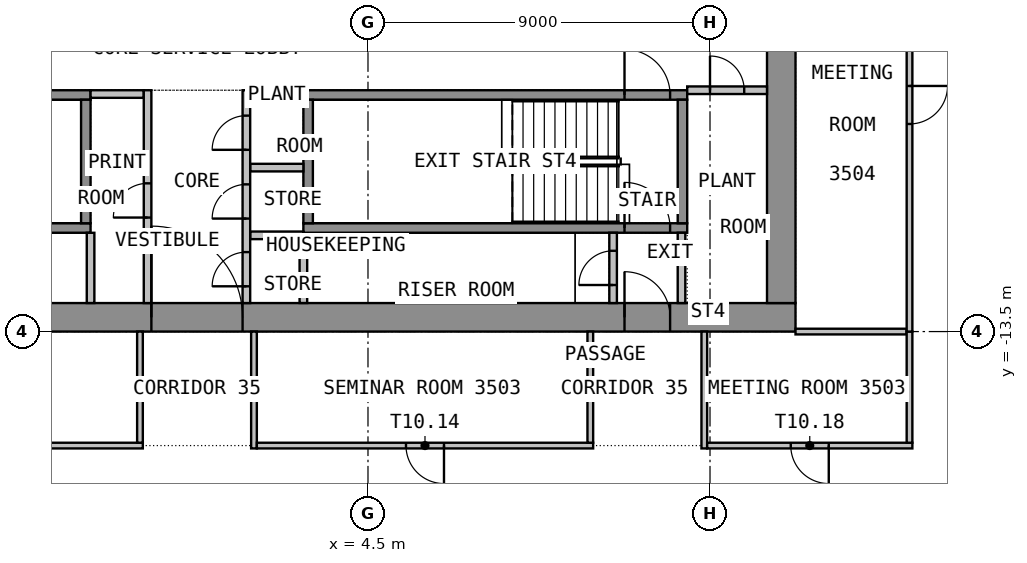
"""IFC4 building model, lengths in metres.
Left out: names, types, materials, properties, quantities, classifications, styles, units other than length and angle.
Written with IfcOpenShell. Run it as: python <this file> out.ifc"""

import sys

from ifc_helpers import new_model, si_unit, direction, frame, frame_2d, origin, place, context, subcontext, project, spatial, rectangle, extrude, element, fill, save


model = new_model("IFC4")
c1 = context("Model", 3, precision=1e-05, world=origin(), true_north=direction((0.0, 1.0)))
c2 = subcontext(c1, "Body", "Model", "MODEL_VIEW")
j1 = project(units=[si_unit("LENGTHUNIT", "METRE"), si_unit("PLANEANGLEUNIT", "RADIAN")], contexts=[c1])
p1 = place(None, origin())
s1 = spatial("IfcSite", under=j1, at=p1, CompositionType="ELEMENT")
p2 = place(p1, origin())
s2 = spatial("IfcBuilding", under=s1, at=p2, CompositionType="ELEMENT")
p3 = place(p2, frame((0.0, 0.0, 144.3)))
s3 = spatial("IfcBuildingStorey", under=s2, at=p3, CompositionType="ELEMENT", Elevation=144.3)
p4 = place(p3, frame((-15.75, -13.125, 0.0), z_axis=(0.0, 0.0, 1.0), x_axis=(1.0, 0.0, 0.0)))
e1 = element("IfcWall", 1, at=p4, inside=s3, PredefinedType="SHEAR", context=c2, shape_type="SweptSolid", body=[
    extrude(rectangle(XDim=31.5, YDim=0.75, at=frame_2d((15.75, 0.0))), origin(), (0.0, 0.0, 1.0), 3.575),
])
p5 = place(p4, frame((14.55, 0.0, 0.0)))
e2 = element("IfcOpeningElement", 2, at=p5, cuts=e1, PredefinedType="OPENING", context=c2, shape_type="SweptSolid", body=[
    extrude(rectangle(XDim=2.4, YDim=2.1, at=frame_2d((1.2, 1.05))), frame((0.0, 0.385, 0.0), z_axis=(0.0, -1.0, 0.0), x_axis=(1.0, 0.0, 0.0)), (0.0, 0.0, 1.0), 0.77),
])
p6 = place(p4, frame((3.3, 0.0, 0.0)))
e3 = element("IfcOpeningElement", 3, at=p6, cuts=e1, PredefinedType="OPENING", context=c2, shape_type="SweptSolid", body=[
    extrude(rectangle(XDim=1.2, YDim=2.1, at=frame_2d((0.6, 1.05))), frame((0.0, 0.385, 0.0), z_axis=(0.0, -1.0, 0.0), x_axis=(1.0, 0.0, 0.0)), (0.0, 0.0, 1.0), 0.77),
])
p7 = place(p4, frame((27.0, 0.0, 0.0)))
e4 = element("IfcOpeningElement", 4, at=p7, cuts=e1, PredefinedType="OPENING", context=c2, shape_type="SweptSolid", body=[
    extrude(rectangle(XDim=1.2, YDim=2.1, at=frame_2d((0.6, 1.05))), frame((0.0, 0.385, 0.0), z_axis=(0.0, -1.0, 0.0), x_axis=(1.0, 0.0, 0.0)), (0.0, 0.0, 1.0), 0.77),
])
p8 = place(p3, frame((15.375, -12.75, 0.0), z_axis=(0.0, 0.0, 1.0), x_axis=(0.0, 1.0, 0.0)))
e5 = element("IfcWall", 5, at=p8, inside=s3, PredefinedType="SHEAR", context=c2, shape_type="SweptSolid", body=[
    extrude(rectangle(XDim=25.5, YDim=0.75, at=frame_2d((12.75, 0.0))), origin(), (0.0, 0.0, 1.0), 3.575),
])
p9 = place(p8, frame((11.55, 0.0, 0.0)))
e6 = element("IfcOpeningElement", 6, at=p9, cuts=e5, PredefinedType="OPENING", context=c2, shape_type="SweptSolid", body=[
    extrude(rectangle(XDim=2.4, YDim=2.1, at=frame_2d((1.2, 1.05))), frame((0.0, 0.385, 0.0), z_axis=(0.0, -1.0, 0.0), x_axis=(1.0, 0.0, 0.0)), (0.0, 0.0, 1.0), 0.77),
])
p10 = place(p3, frame((-12.9, -10.775, 0.0), z_axis=(0.0, 0.0, 1.0), x_axis=(1.0, 0.0, 0.0)))
e7 = element("IfcWall", 7, at=p10, inside=s3, PredefinedType="SHEAR", context=c2, shape_type="SweptSolid", body=[
    extrude(rectangle(XDim=10.1, YDim=0.25, at=frame_2d((5.05, 0.0))), origin(), (0.0, 0.0, 1.0), 3.575),
])
p11 = place(p10, frame((0.45, 0.0, 0.0)))
e8 = element("IfcOpeningElement", 8, at=p11, cuts=e7, PredefinedType="OPENING", context=c2, shape_type="SweptSolid", body=[
    extrude(rectangle(XDim=1.2, YDim=2.1, at=frame_2d((0.6, 1.05))), frame((0.0, 0.135, 0.0), z_axis=(0.0, -1.0, 0.0), x_axis=(1.0, 0.0, 0.0)), (0.0, 0.0, 1.0), 0.27),
])
p12 = place(p3, frame((-12.9, -7.275, 0.0), z_axis=(0.0, 0.0, 1.0), x_axis=(1.0, 0.0, 0.0)))
e9 = element("IfcWall", 9, at=p12, inside=s3, PredefinedType="SHEAR", context=c2, shape_type="SweptSolid", body=[
    extrude(rectangle(XDim=10.1, YDim=0.25, at=frame_2d((5.05, 0.0))), origin(), (0.0, 0.0, 1.0), 3.575),
])
p13 = place(p12, frame((0.45, 0.0, 0.0)))
e10 = element("IfcOpeningElement", 10, at=p13, cuts=e9, PredefinedType="OPENING", context=c2, shape_type="SweptSolid", body=[
    extrude(rectangle(XDim=1.2, YDim=2.1, at=frame_2d((0.6, 1.05))), frame((0.0, 0.135, 0.0), z_axis=(0.0, -1.0, 0.0), x_axis=(1.0, 0.0, 0.0)), (0.0, 0.0, 1.0), 0.27),
])
p14 = place(p3, frame((-2.925, -10.65, 0.0), z_axis=(0.0, 0.0, 1.0), x_axis=(0.0, 1.0, 0.0)))
e11 = element("IfcWall", 11, at=p14, inside=s3, PredefinedType="SHEAR", context=c2, shape_type="SweptSolid", body=[
    extrude(rectangle(XDim=3.25, YDim=0.25, at=frame_2d((1.625, 0.0))), origin(), (0.0, 0.0, 1.0), 3.575),
])
p15 = place(p3, frame((2.8, -10.775, 0.0), z_axis=(0.0, 0.0, 1.0), x_axis=(1.0, 0.0, 0.0)))
e12 = element("IfcWall", 12, at=p15, inside=s3, PredefinedType="SHEAR", context=c2, shape_type="SweptSolid", body=[
    extrude(rectangle(XDim=10.1, YDim=0.25, at=frame_2d((5.05, 0.0))), origin(), (0.0, 0.0, 1.0), 3.575),
])
p16 = place(p15, frame((8.45, 0.0, 0.0)))
e13 = element("IfcOpeningElement", 13, at=p16, cuts=e12, PredefinedType="OPENING", context=c2, shape_type="SweptSolid", body=[
    extrude(rectangle(XDim=1.2, YDim=2.1, at=frame_2d((0.6, 1.05))), frame((0.0, 0.135, 0.0), z_axis=(0.0, -1.0, 0.0), x_axis=(1.0, 0.0, 0.0)), (0.0, 0.0, 1.0), 0.27),
])
p17 = place(p3, frame((2.8, -7.275, 0.0), z_axis=(0.0, 0.0, 1.0), x_axis=(1.0, 0.0, 0.0)))
e14 = element("IfcWall", 14, at=p17, inside=s3, PredefinedType="SHEAR", context=c2, shape_type="SweptSolid", body=[
    extrude(rectangle(XDim=10.1, YDim=0.25, at=frame_2d((5.05, 0.0))), origin(), (0.0, 0.0, 1.0), 3.575),
])
p18 = place(p17, frame((8.45, 0.0, 0.0)))
e15 = element("IfcOpeningElement", 15, at=p18, cuts=e14, PredefinedType="OPENING", context=c2, shape_type="SweptSolid", body=[
    extrude(rectangle(XDim=1.2, YDim=2.1, at=frame_2d((0.6, 1.05))), frame((0.0, 0.135, 0.0), z_axis=(0.0, -1.0, 0.0), x_axis=(1.0, 0.0, 0.0)), (0.0, 0.0, 1.0), 0.27),
])
for number, where, z_axis, x_axis in (
    (16, (2.925, -10.65, 0.0), (0.0, 0.0, 1.0), (0.0, 1.0, 0.0)),
    (17, (12.775, -10.65, 0.0), (0.0, 0.0, 1.0), (0.0, 1.0, 0.0)),
):
    element("IfcWall", number, at=place(p3, frame(where, z_axis=z_axis, x_axis=x_axis)), inside=s3, PredefinedType="SHEAR", context=c2, shape_type="SweptSolid", body=[
        extrude(rectangle(XDim=3.25, YDim=0.25, at=frame_2d((1.625, 0.0))), origin(), (0.0, 0.0, 1.0), 3.575),
    ])
for number, where, z_axis, x_axis in (
    (18, (-2.8, -7.25, 0.0), (0.0, 0.0, 1.0), (1.0, 0.0, 0.0)),
    (19, (1.4, -7.25, 0.0), (0.0, 0.0, 1.0), (1.0, 0.0, 0.0)),
    (20, (1.4, -9.186, 0.0), (0.0, 0.0, 1.0), (1.0, 0.0, 0.0)),
    (21, (1.4, -10.968, 0.0), (0.0, 0.0, 1.0), (1.0, 0.0, 0.0)),
):
    element("IfcWall", number, at=place(p3, frame(where, z_axis=z_axis, x_axis=x_axis)), inside=s3, PredefinedType="PARTITIONING", context=c2, shape_type="SweptSolid", body=[
        extrude(rectangle(XDim=1.4, YDim=0.2, at=frame_2d((0.7, 0.0))), origin(), (0.0, 0.0, 1.0), 3.575),
    ])
p19 = place(p3, frame((-1.3, -12.75, 0.0), z_axis=(0.0, 0.0, 1.0), x_axis=(0.0, 1.0, 0.0)))
e22 = element("IfcWall", 22, at=p19, inside=s3, PredefinedType="PARTITIONING", context=c2, shape_type="SweptSolid", body=[
    extrude(rectangle(XDim=5.6, YDim=0.2, at=frame_2d((2.8, 0.0))), origin(), (0.0, 0.0, 1.0), 3.575),
])
p20 = place(p19, frame((2.25, 0.0, 0.0)))
e23 = element("IfcOpeningElement", 23, at=p20, cuts=e22, PredefinedType="OPENING", context=c2, shape_type="SweptSolid", body=[
    extrude(rectangle(XDim=0.9, YDim=2.1, at=frame_2d((0.45, 1.05))), frame((0.0, 0.11, 0.0), z_axis=(0.0, -1.0, 0.0), x_axis=(1.0, 0.0, 0.0)), (0.0, 0.0, 1.0), 0.22),
])
p21 = place(p3, frame((1.3, -12.75, 0.0), z_axis=(0.0, 0.0, 1.0), x_axis=(0.0, 1.0, 0.0)))
e24 = element("IfcWall", 24, at=p21, inside=s3, PredefinedType="PARTITIONING", context=c2, shape_type="SweptSolid", body=[
    extrude(rectangle(XDim=5.6, YDim=0.2, at=frame_2d((2.8, 0.0))), origin(), (0.0, 0.0, 1.0), 3.575),
])
p22 = place(p21, frame((0.441, 0.0, 0.0)))
e25 = element("IfcOpeningElement", 25, at=p22, cuts=e24, PredefinedType="OPENING", context=c2, shape_type="SweptSolid", body=[
    extrude(rectangle(XDim=0.9, YDim=2.1, at=frame_2d((0.45, 1.05))), frame((0.0, 0.11, 0.0), z_axis=(0.0, -1.0, 0.0), x_axis=(1.0, 0.0, 0.0)), (0.0, 0.0, 1.0), 0.22),
])
p23 = place(p21, frame((2.223, 0.0, 0.0)))
e26 = element("IfcOpeningElement", 26, at=p23, cuts=e24, PredefinedType="OPENING", context=c2, shape_type="SweptSolid", body=[
    extrude(rectangle(XDim=0.9, YDim=2.1, at=frame_2d((0.45, 1.05))), frame((0.0, 0.11, 0.0), z_axis=(0.0, -1.0, 0.0), x_axis=(1.0, 0.0, 0.0)), (0.0, 0.0, 1.0), 0.22),
])
p24 = place(p21, frame((4.032, 0.0, 0.0)))
e27 = element("IfcOpeningElement", 27, at=p24, cuts=e24, PredefinedType="OPENING", context=c2, shape_type="SweptSolid", body=[
    extrude(rectangle(XDim=0.9, YDim=2.1, at=frame_2d((0.45, 1.05))), frame((0.0, 0.11, 0.0), z_axis=(0.0, -1.0, 0.0), x_axis=(1.0, 0.0, 0.0)), (0.0, 0.0, 1.0), 0.22),
])
p25 = place(p3, frame((12.75, -12.75, 0.0), z_axis=(0.0, 0.0, 1.0), x_axis=(0.0, 1.0, 0.0)))
e28 = element("IfcWall", 28, at=p25, inside=s3, PredefinedType="PARTITIONING", context=c2, shape_type="SweptSolid", body=[
    extrude(rectangle(XDim=1.85, YDim=0.2, at=frame_2d((0.925, 0.0))), origin(), (0.0, 0.0, 1.0), 3.575),
])
p26 = place(p3, frame((10.95, -12.75, 0.0), z_axis=(0.0, 0.0, 1.0), x_axis=(0.0, 1.0, 0.0)))
e29 = element("IfcWall", 29, at=p26, inside=s3, PredefinedType="PARTITIONING", context=c2, shape_type="SweptSolid", body=[
    extrude(rectangle(XDim=1.85, YDim=0.2, at=frame_2d((0.925, 0.0))), origin(), (0.0, 0.0, 1.0), 3.575),
])
p27 = place(p26, frame((0.475, 0.0, 0.0)))
e30 = element("IfcOpeningElement", 30, at=p27, cuts=e29, PredefinedType="OPENING", context=c2, shape_type="SweptSolid", body=[
    extrude(rectangle(XDim=0.9, YDim=2.1, at=frame_2d((0.45, 1.05))), frame((0.0, 0.11, 0.0), z_axis=(0.0, -1.0, 0.0), x_axis=(1.0, 0.0, 0.0)), (0.0, 0.0, 1.0), 0.22),
])
p28 = place(p3, frame((12.9, -7.15, 0.0), z_axis=(0.0, 0.0, 1.0), x_axis=(1.0, 0.0, 0.0)))
e31 = element("IfcWall", 31, at=p28, inside=s3, PredefinedType="PARTITIONING", context=c2, shape_type="SweptSolid", body=[
    extrude(rectangle(XDim=2.1, YDim=0.2, at=frame_2d((1.05, 0.0))), origin(), (0.0, 0.0, 1.0), 3.575),
])
p29 = place(p28, frame((0.6, 0.0, 0.0)))
e32 = element("IfcOpeningElement", 32, at=p29, cuts=e31, PredefinedType="OPENING", context=c2, shape_type="SweptSolid", body=[
    extrude(rectangle(XDim=0.9, YDim=2.1, at=frame_2d((0.45, 1.05))), frame((0.0, 0.11, 0.0), z_axis=(0.0, -1.0, 0.0), x_axis=(1.0, 0.0, 0.0)), (0.0, 0.0, 1.0), 0.22),
])
p30 = place(p3, frame((-1.425, -16.5, 0.0), z_axis=(0.0, 0.0, 1.0), x_axis=(-1.0, 0.0, 0.0)))
e33 = element("IfcWall", 33, at=p30, inside=s3, PredefinedType="PARTITIONING", context=c2, shape_type="SweptSolid", body=[
    extrude(rectangle(XDim=8.85, YDim=0.15, at=frame_2d((4.425, 0.0))), origin(), (0.0, 0.0, 1.0), 3.575),
])
p31 = place(p30, frame((3.925, 0.0, 0.0)))
e34 = element("IfcOpeningElement", 34, at=p31, cuts=e33, PredefinedType="OPENING", context=c2, shape_type="SweptSolid", body=[
    extrude(rectangle(XDim=1.0, YDim=2.1, at=frame_2d((0.5, 1.05))), frame((0.0, 0.085, 0.0), z_axis=(0.0, -1.0, 0.0), x_axis=(1.0, 0.0, 0.0)), (0.0, 0.0, 1.0), 0.17),
])
p32 = place(p3, frame((-1.5, -13.5, 0.0), z_axis=(0.0, 0.0, 1.0), x_axis=(0.0, -1.0, 0.0)))
e35 = element("IfcWall", 35, at=p32, inside=s3, PredefinedType="PARTITIONING", context=c2, shape_type="SweptSolid", body=[
    extrude(rectangle(XDim=2.925, YDim=0.15, at=frame_2d((1.462, 0.0))), origin(), (0.0, 0.0, 1.0), 3.575),
])
p33 = place(p3, frame((1.5, -16.575, 0.0), z_axis=(0.0, 0.0, 1.0), x_axis=(0.0, 1.0, 0.0)))
e36 = element("IfcWall", 36, at=p33, inside=s3, PredefinedType="PARTITIONING", context=c2, shape_type="SweptSolid", body=[
    extrude(rectangle(XDim=3.075, YDim=0.15, at=frame_2d((1.538, 0.0))), origin(), (0.0, 0.0, 1.0), 3.575),
])
p34 = place(p3, frame((10.425, -16.5, 0.0), z_axis=(0.0, 0.0, 1.0), x_axis=(-1.0, 0.0, 0.0)))
e37 = element("IfcWall", 37, at=p34, inside=s3, PredefinedType="PARTITIONING", context=c2, shape_type="SweptSolid", body=[
    extrude(rectangle(XDim=8.85, YDim=0.15, at=frame_2d((4.425, 0.0))), origin(), (0.0, 0.0, 1.0), 3.575),
])
p35 = place(p34, frame((3.925, 0.0, 0.0)))
e38 = element("IfcOpeningElement", 38, at=p35, cuts=e37, PredefinedType="OPENING", context=c2, shape_type="SweptSolid", body=[
    extrude(rectangle(XDim=1.0, YDim=2.1, at=frame_2d((0.5, 1.05))), frame((0.0, 0.085, 0.0), z_axis=(0.0, -1.0, 0.0), x_axis=(1.0, 0.0, 0.0)), (0.0, 0.0, 1.0), 0.17),
])
p36 = place(p3, frame((10.35, -13.5, 0.0), z_axis=(0.0, 0.0, 1.0), x_axis=(0.0, -1.0, 0.0)))
e39 = element("IfcWall", 39, at=p36, inside=s3, PredefinedType="PARTITIONING", context=c2, shape_type="SweptSolid", body=[
    extrude(rectangle(XDim=2.925, YDim=0.15, at=frame_2d((1.462, 0.0))), origin(), (0.0, 0.0, 1.0), 3.575),
])
p37 = place(p3, frame((13.35, -16.575, 0.0), z_axis=(0.0, 0.0, 1.0), x_axis=(0.0, 1.0, 0.0)))
e40 = element("IfcWall", 40, at=p37, inside=s3, PredefinedType="PARTITIONING", context=c2, shape_type="SweptSolid", body=[
    extrude(rectangle(XDim=3.075, YDim=0.15, at=frame_2d((1.538, 0.0))), origin(), (0.0, 0.0, 1.0), 3.575),
])
p38 = place(p3, frame((18.825, -16.5, 0.0), z_axis=(0.0, 0.0, 1.0), x_axis=(-1.0, 0.0, 0.0)))
e41 = element("IfcWall", 41, at=p38, inside=s3, PredefinedType="PARTITIONING", context=c2, shape_type="SweptSolid", body=[
    extrude(rectangle(XDim=5.4, YDim=0.15, at=frame_2d((2.7, 0.0))), origin(), (0.0, 0.0, 1.0), 3.575),
])
p39 = place(p38, frame((2.2, 0.0, 0.0)))
e42 = element("IfcOpeningElement", 42, at=p39, cuts=e41, PredefinedType="OPENING", context=c2, shape_type="SweptSolid", body=[
    extrude(rectangle(XDim=1.0, YDim=2.1, at=frame_2d((0.5, 1.05))), frame((0.0, 0.085, 0.0), z_axis=(0.0, -1.0, 0.0), x_axis=(1.0, 0.0, 0.0)), (0.0, 0.0, 1.0), 0.17),
])
for number, where, z_axis, x_axis in (
    (43, (15.75, -13.5, 0.0), (0.0, 0.0, 1.0), (1.0, 0.0, 0.0)),
    (44, (18.75, -13.5, 0.0), (0.0, 0.0, 1.0), (0.0, -1.0, 0.0)),
):
    element("IfcWall", number, at=place(p3, frame(where, z_axis=z_axis, x_axis=x_axis)), inside=s3, PredefinedType="PARTITIONING", context=c2, shape_type="SweptSolid", body=[
        extrude(rectangle(XDim=2.925, YDim=0.15, at=frame_2d((1.462, 0.0))), origin(), (0.0, 0.0, 1.0), 3.575),
    ])
p40 = place(p3, frame((18.75, -1.575, 0.0), z_axis=(0.0, 0.0, 1.0), x_axis=(0.0, -1.0, 0.0)))
e45 = element("IfcWall", 45, at=p40, inside=s3, PredefinedType="PARTITIONING", context=c2, shape_type="SweptSolid", body=[
    extrude(rectangle(XDim=11.925, YDim=0.15, at=frame_2d((5.962, 0.0))), origin(), (0.0, 0.0, 1.0), 3.575),
])
p41 = place(p40, frame((5.462, 0.0, 0.0)))
e46 = element("IfcOpeningElement", 46, at=p41, cuts=e45, PredefinedType="OPENING", context=c2, shape_type="SweptSolid", body=[
    extrude(rectangle(XDim=1.0, YDim=2.1, at=frame_2d((0.5, 1.05))), frame((0.0, 0.085, 0.0), z_axis=(0.0, -1.0, 0.0), x_axis=(1.0, 0.0, 0.0)), (0.0, 0.0, 1.0), 0.17),
])
p42 = place(p3, frame((-2.8, -12.749, 0.0), z_axis=(0.0, 0.0, 1.0), x_axis=(0.0, 1.0, 0.0)))
e47 = element("IfcWall", 47, at=p42, inside=s3, PredefinedType="PARTITIONING", context=c2, shape_type="SweptSolid", body=[
    extrude(rectangle(XDim=1.848, YDim=0.2, at=frame_2d((0.924, 0.0))), origin(), (0.0, 0.0, 1.0), 3.575),
])
p43 = place(p3, frame((2.8, -11.069, 0.0), z_axis=(0.0, 0.0, 1.0), x_axis=(0.0, -1.0, 0.0)))
e48 = element("IfcWall", 48, at=p43, inside=s3, PredefinedType="PARTITIONING", context=c2, shape_type="SweptSolid", body=[
    extrude(rectangle(XDim=1.68, YDim=0.2, at=frame_2d((0.84, 0.0))), origin(), (0.0, 0.0, 1.0), 3.575),
])
p44 = place(p5, origin())
e49 = element("IfcDoor", 49, at=p44, inside=s3, OperationType="DOUBLE_DOOR_DOUBLE_SWING", PredefinedType="DOOR", context=c2, shape_type="SweptSolid", body=[
    extrude(rectangle(XDim=2.4, YDim=2.1, at=frame_2d((1.2, 1.05))), frame((0.0, 0.025, 0.0), z_axis=(0.0, -1.0, 0.0), x_axis=(1.0, 0.0, 0.0)), (0.0, 0.0, 1.0), 0.05),
])
fill(e2, e49)
p45 = place(p7, origin())
e50 = element("IfcDoor", 50, at=p45, inside=s3, OperationType="SINGLE_SWING_RIGHT", PredefinedType="DOOR", context=c2, shape_type="SweptSolid", body=[
    extrude(rectangle(XDim=1.2, YDim=2.1, at=frame_2d((0.6, 1.05))), frame((0.0, 0.025, 0.0), z_axis=(0.0, -1.0, 0.0), x_axis=(1.0, 0.0, 0.0)), (0.0, 0.0, 1.0), 0.05),
])
fill(e4, e50)
p46 = place(p18, origin())
e51 = element("IfcDoor", 51, at=p46, inside=s3, OperationType="SINGLE_SWING_LEFT", PredefinedType="DOOR", context=c2, shape_type="SweptSolid", body=[
    extrude(rectangle(XDim=1.2, YDim=2.1, at=frame_2d((0.6, 1.05))), frame((0.0, 0.025, 0.0), z_axis=(0.0, -1.0, 0.0), x_axis=(1.0, 0.0, 0.0)), (0.0, 0.0, 1.0), 0.05),
])
fill(e15, e51)
p47 = place(p20, origin())
e52 = element("IfcDoor", 52, at=p47, inside=s3, OperationType="SINGLE_SWING_LEFT", PredefinedType="DOOR", context=c2, shape_type="SweptSolid", body=[
    extrude(rectangle(XDim=0.9, YDim=2.1, at=frame_2d((0.45, 1.05))), frame((0.0, 0.025, 0.0), z_axis=(0.0, -1.0, 0.0), x_axis=(1.0, 0.0, 0.0)), (0.0, 0.0, 1.0), 0.05),
])
fill(e23, e52)
p48 = place(p22, origin())
e53 = element("IfcDoor", 53, at=p48, inside=s3, OperationType="SINGLE_SWING_LEFT", PredefinedType="DOOR", context=c2, shape_type="SweptSolid", body=[
    extrude(rectangle(XDim=0.9, YDim=2.1, at=frame_2d((0.45, 1.05))), frame((0.0, 0.025, 0.0), z_axis=(0.0, -1.0, 0.0), x_axis=(1.0, 0.0, 0.0)), (0.0, 0.0, 1.0), 0.05),
])
fill(e25, e53)
p49 = place(p23, origin())
e54 = element("IfcDoor", 54, at=p49, inside=s3, OperationType="SINGLE_SWING_LEFT", PredefinedType="DOOR", context=c2, shape_type="SweptSolid", body=[
    extrude(rectangle(XDim=0.9, YDim=2.1, at=frame_2d((0.45, 1.05))), frame((0.0, 0.025, 0.0), z_axis=(0.0, -1.0, 0.0), x_axis=(1.0, 0.0, 0.0)), (0.0, 0.0, 1.0), 0.05),
])
fill(e26, e54)
p50 = place(p24, origin())
e55 = element("IfcDoor", 55, at=p50, inside=s3, OperationType="SINGLE_SWING_LEFT", PredefinedType="DOOR", context=c2, shape_type="SweptSolid", body=[
    extrude(rectangle(XDim=0.9, YDim=2.1, at=frame_2d((0.45, 1.05))), frame((0.0, 0.025, 0.0), z_axis=(0.0, -1.0, 0.0), x_axis=(1.0, 0.0, 0.0)), (0.0, 0.0, 1.0), 0.05),
])
fill(e27, e55)
p51 = place(p16, origin())
e56 = element("IfcDoor", 56, at=p51, inside=s3, OperationType="SINGLE_SWING_RIGHT", PredefinedType="DOOR", context=c2, shape_type="SweptSolid", body=[
    extrude(rectangle(XDim=1.2, YDim=2.1, at=frame_2d((0.6, 1.05))), frame((0.0, 0.025, 0.0), z_axis=(0.0, -1.0, 0.0), x_axis=(1.0, 0.0, 0.0)), (0.0, 0.0, 1.0), 0.05),
])
fill(e13, e56)
p52 = place(p27, origin())
e57 = element("IfcDoor", 57, at=p52, inside=s3, OperationType="SINGLE_SWING_LEFT", PredefinedType="DOOR", context=c2, shape_type="SweptSolid", body=[
    extrude(rectangle(XDim=0.9, YDim=2.1, at=frame_2d((0.45, 1.05))), frame((0.0, 0.025, 0.0), z_axis=(0.0, -1.0, 0.0), x_axis=(1.0, 0.0, 0.0)), (0.0, 0.0, 1.0), 0.05),
])
fill(e30, e57)
p53 = place(p29, origin())
e58 = element("IfcDoor", 58, at=p53, inside=s3, OperationType="SINGLE_SWING_LEFT", PredefinedType="DOOR", context=c2, shape_type="SweptSolid", body=[
    extrude(rectangle(XDim=0.9, YDim=2.1, at=frame_2d((0.45, 1.05))), frame((0.0, 0.025, 0.0), z_axis=(0.0, -1.0, 0.0), x_axis=(1.0, 0.0, 0.0)), (0.0, 0.0, 1.0), 0.05),
])
fill(e32, e58)
p54 = place(p35, origin())
e59 = element("IfcDoor", 59, at=p54, inside=s3, OperationType="SINGLE_SWING_RIGHT", PredefinedType="DOOR", context=c2, shape_type="SweptSolid", body=[
    extrude(rectangle(XDim=1.0, YDim=2.1, at=frame_2d((0.5, 1.05))), frame((0.0, 0.025, 0.0), z_axis=(0.0, -1.0, 0.0), x_axis=(1.0, 0.0, 0.0)), (0.0, 0.0, 1.0), 0.05),
])
fill(e38, e59)
p55 = place(p39, origin())
e60 = element("IfcDoor", 60, at=p55, inside=s3, OperationType="SINGLE_SWING_RIGHT", PredefinedType="DOOR", context=c2, shape_type="SweptSolid", body=[
    extrude(rectangle(XDim=1.0, YDim=2.1, at=frame_2d((0.5, 1.05))), frame((0.0, 0.025, 0.0), z_axis=(0.0, -1.0, 0.0), x_axis=(1.0, 0.0, 0.0)), (0.0, 0.0, 1.0), 0.05),
])
fill(e42, e60)
p56 = place(p41, origin())
e61 = element("IfcDoor", 61, at=p56, inside=s3, OperationType="SINGLE_SWING_LEFT", PredefinedType="DOOR", context=c2, shape_type="SweptSolid", body=[
    extrude(rectangle(XDim=1.0, YDim=2.1, at=frame_2d((0.5, 1.05))), frame((0.0, 0.025, 0.0), z_axis=(0.0, -1.0, 0.0), x_axis=(1.0, 0.0, 0.0)), (0.0, 0.0, 1.0), 0.05),
])
fill(e46, e61)
save(model, sys.argv[1])
